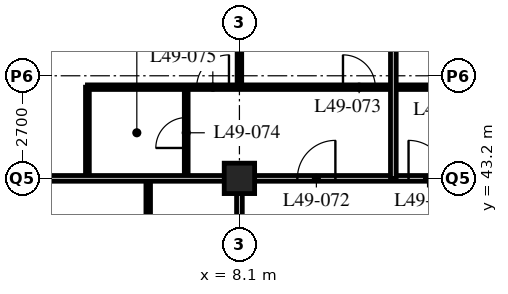
"""IFC4 building model, lengths in metres.
Left out: names, types, materials, properties, quantities, classifications, styles, units other than length and angle.
Written with IfcOpenShell. Run it as: python <this file> out.ifc"""

import sys

from ifc_helpers import new_model, si_unit, direction, frame, frame_2d, origin, origin_2d, place, context, subcontext, project, spatial, rectangle, hollow_rectangle, extrude, element, fill, save


model = new_model("IFC4")
c1 = context("Model", 3, precision=1e-05, world=origin(), true_north=direction((0.0, 1.0)))
c2 = subcontext(c1, "Body", "Model", "MODEL_VIEW")
j1 = project(units=[si_unit("LENGTHUNIT", "METRE"), si_unit("PLANEANGLEUNIT", "RADIAN")], contexts=[c1])
p1 = place(None, origin())
s1 = spatial("IfcSite", under=j1, at=p1, CompositionType="ELEMENT")
p2 = place(p1, origin())
s2 = spatial("IfcBuilding", under=s1, at=p2, CompositionType="ELEMENT")
p3 = place(p2, frame((0.0, 0.0, 192.0)))
s3 = spatial("IfcBuildingStorey", under=s2, at=p3, CompositionType="ELEMENT", Elevation=192.0)
p4 = place(p3, frame((8.1, 43.2, 0.0), z_axis=(0.0, 0.0, 1.0), x_axis=(1.0, 0.0, 0.0)))
e1 = element("IfcColumn", 1, at=p4, inside=s3, PredefinedType="COLUMN", context=c2, shape_type="SweptSolid", body=[
    extrude(hollow_rectangle(XDim=0.8, YDim=0.8, WallThickness=0.08, at=origin_2d()), origin(), (0.0, 0.0, 1.0), 3.6),
])
p5 = place(p3, frame((8.1, 43.2, 0.0), z_axis=(0.0, 0.0, 1.0), x_axis=(1.0, 0.0, 0.0)))
e2 = element("IfcWall", 2, at=p5, inside=s3, PredefinedType="PARTITIONING", context=c2, shape_type="SweptSolid", body=[
    extrude(rectangle(XDim=40.5, YDim=0.15, at=frame_2d((20.25, 0.0))), origin(), (0.0, 0.0, 1.0), 2.778),
])
p6 = place(p5, frame((4.45, 0.0, 0.0)))
e3 = element("IfcOpeningElement", 3, at=p6, cuts=e2, PredefinedType="OPENING", context=c2, shape_type="SweptSolid", body=[
    extrude(rectangle(XDim=1.0, YDim=2.1, at=frame_2d((0.5, 1.05))), frame((0.0, 0.085, 0.0), z_axis=(0.0, -1.0, 0.0), x_axis=(1.0, 0.0, 0.0)), (0.0, 0.0, 1.0), 0.17),
])
p7 = place(p5, frame((20.65, 0.0, 0.0)))
e4 = element("IfcOpeningElement", 4, at=p7, cuts=e2, PredefinedType="OPENING", context=c2, shape_type="SweptSolid", body=[
    extrude(rectangle(XDim=1.0, YDim=2.1, at=frame_2d((0.5, 1.05))), frame((0.0, 0.085, 0.0), z_axis=(0.0, -1.0, 0.0), x_axis=(1.0, 0.0, 0.0)), (0.0, 0.0, 1.0), 0.17),
])
p8 = place(p5, frame((28.75, 0.0, 0.0)))
e5 = element("IfcOpeningElement", 5, at=p8, cuts=e2, PredefinedType="OPENING", context=c2, shape_type="SweptSolid", body=[
    extrude(rectangle(XDim=1.0, YDim=2.1, at=frame_2d((0.5, 1.05))), frame((0.0, 0.085, 0.0), z_axis=(0.0, -1.0, 0.0), x_axis=(1.0, 0.0, 0.0)), (0.0, 0.0, 1.0), 0.17),
])
p9 = place(p5, frame((37.975, 0.0, 0.0)))
e6 = element("IfcOpeningElement", 6, at=p9, cuts=e2, PredefinedType="OPENING", context=c2, shape_type="SweptSolid", body=[
    extrude(rectangle(XDim=1.0, YDim=2.1, at=frame_2d((0.5, 1.05))), frame((0.0, 0.085, 0.0), z_axis=(0.0, -1.0, 0.0), x_axis=(1.0, 0.0, 0.0)), (0.0, 0.0, 1.0), 0.17),
])
p10 = place(p5, frame((1.525, 0.0, 0.0)))
e7 = element("IfcOpeningElement", 7, at=p10, cuts=e2, PredefinedType="OPENING", context=c2, shape_type="SweptSolid", body=[
    extrude(rectangle(XDim=1.0, YDim=2.1, at=frame_2d((0.5, 1.05))), frame((0.0, 0.085, 0.0), z_axis=(0.0, -1.0, 0.0), x_axis=(1.0, 0.0, 0.0)), (0.0, 0.0, 1.0), 0.17),
])
p11 = place(p3, frame((8.1, 18.9, 0.0), z_axis=(0.0, 0.0, 1.0), x_axis=(0.0, 1.0, 0.0)))
e8 = element("IfcWall", 8, at=p11, inside=s3, PredefinedType="PARTITIONING", context=c2, shape_type="SweptSolid", body=[
    extrude(rectangle(XDim=24.3, YDim=0.15, at=frame_2d((12.15, 0.0))), origin(), (0.0, 0.0, 1.0), 2.778),
])
p12 = place(p11, frame((0.9, 0.0, 0.0)))
e9 = element("IfcOpeningElement", 9, at=p12, cuts=e8, PredefinedType="OPENING", context=c2, shape_type="SweptSolid", body=[
    extrude(rectangle(XDim=1.0, YDim=2.1, at=frame_2d((0.5, 1.05))), frame((0.0, 0.085, 0.0), z_axis=(0.0, -1.0, 0.0), x_axis=(1.0, 0.0, 0.0)), (0.0, 0.0, 1.0), 0.17),
])
p13 = place(p11, frame((9.0, 0.0, 0.0)))
e10 = element("IfcOpeningElement", 10, at=p13, cuts=e8, PredefinedType="OPENING", context=c2, shape_type="SweptSolid", body=[
    extrude(rectangle(XDim=1.0, YDim=2.1, at=frame_2d((0.5, 1.05))), frame((0.0, 0.085, 0.0), z_axis=(0.0, -1.0, 0.0), x_axis=(1.0, 0.0, 0.0)), (0.0, 0.0, 1.0), 0.17),
])
p14 = place(p11, frame((17.1, 0.0, 0.0)))
e11 = element("IfcOpeningElement", 11, at=p14, cuts=e8, PredefinedType="OPENING", context=c2, shape_type="SweptSolid", body=[
    extrude(rectangle(XDim=1.0, YDim=2.1, at=frame_2d((0.5, 1.05))), frame((0.0, 0.085, 0.0), z_axis=(0.0, -1.0, 0.0), x_axis=(1.0, 0.0, 0.0)), (0.0, 0.0, 1.0), 0.17),
])
p15 = place(p3, frame((5.7, 18.9, 0.0), z_axis=(0.0, 0.0, 1.0), x_axis=(0.0, 1.0, 0.0)))
e12 = element("IfcWall", 12, at=p15, inside=s3, PredefinedType="PARTITIONING", context=c2, shape_type="SweptSolid", body=[
    extrude(rectangle(XDim=24.3, YDim=0.12, at=frame_2d((12.15, 0.0))), origin(), (0.0, 0.0, 1.0), 3.39),
])
p16 = place(p15, frame((0.975, 0.0, 0.0)))
e13 = element("IfcOpeningElement", 13, at=p16, cuts=e12, PredefinedType="OPENING", context=c2, shape_type="SweptSolid", body=[
    extrude(rectangle(XDim=0.85, YDim=2.1, at=frame_2d((0.425, 1.05))), frame((0.0, 0.07, 0.0), z_axis=(0.0, -1.0, 0.0), x_axis=(1.0, 0.0, 0.0)), (0.0, 0.0, 1.0), 0.14),
])
p17 = place(p15, frame((4.375, 0.0, 0.0)))
e14 = element("IfcOpeningElement", 14, at=p17, cuts=e12, PredefinedType="OPENING", context=c2, shape_type="SweptSolid", body=[
    extrude(rectangle(XDim=0.85, YDim=2.1, at=frame_2d((0.425, 1.05))), frame((0.0, 0.07, 0.0), z_axis=(0.0, -1.0, 0.0), x_axis=(1.0, 0.0, 0.0)), (0.0, 0.0, 1.0), 0.14),
])
p18 = place(p15, frame((9.075, 0.0, 0.0)))
e15 = element("IfcOpeningElement", 15, at=p18, cuts=e12, PredefinedType="OPENING", context=c2, shape_type="SweptSolid", body=[
    extrude(rectangle(XDim=0.85, YDim=2.1, at=frame_2d((0.425, 1.05))), frame((0.0, 0.07, 0.0), z_axis=(0.0, -1.0, 0.0), x_axis=(1.0, 0.0, 0.0)), (0.0, 0.0, 1.0), 0.14),
])
p19 = place(p15, frame((12.475, 0.0, 0.0)))
e16 = element("IfcOpeningElement", 16, at=p19, cuts=e12, PredefinedType="OPENING", context=c2, shape_type="SweptSolid", body=[
    extrude(rectangle(XDim=0.85, YDim=2.1, at=frame_2d((0.425, 1.05))), frame((0.0, 0.07, 0.0), z_axis=(0.0, -1.0, 0.0), x_axis=(1.0, 0.0, 0.0)), (0.0, 0.0, 1.0), 0.14),
])
p20 = place(p15, frame((17.175, 0.0, 0.0)))
e17 = element("IfcOpeningElement", 17, at=p20, cuts=e12, PredefinedType="OPENING", context=c2, shape_type="SweptSolid", body=[
    extrude(rectangle(XDim=0.85, YDim=2.1, at=frame_2d((0.425, 1.05))), frame((0.0, 0.07, 0.0), z_axis=(0.0, -1.0, 0.0), x_axis=(1.0, 0.0, 0.0)), (0.0, 0.0, 1.0), 0.14),
])
p21 = place(p15, frame((20.575, 0.0, 0.0)))
e18 = element("IfcOpeningElement", 18, at=p21, cuts=e12, PredefinedType="OPENING", context=c2, shape_type="SweptSolid", body=[
    extrude(rectangle(XDim=0.85, YDim=2.1, at=frame_2d((0.425, 1.05))), frame((0.0, 0.07, 0.0), z_axis=(0.0, -1.0, 0.0), x_axis=(1.0, 0.0, 0.0)), (0.0, 0.0, 1.0), 0.14),
])
p22 = place(p3, frame((6.7, 43.2, 0.0), z_axis=(0.0, 0.0, 1.0), x_axis=(0.0, 1.0, 0.0)))
e19 = element("IfcWall", 19, at=p22, inside=s3, PredefinedType="PARTITIONING", context=c2, shape_type="SweptSolid", body=[
    extrude(rectangle(XDim=2.4, YDim=0.1, at=frame_2d((1.2, 0.0))), origin(), (0.0, 0.0, 1.0), 3.39),
])
p23 = place(p22, frame((0.8, 0.0, 0.0)))
e20 = element("IfcOpeningElement", 20, at=p23, cuts=e19, PredefinedType="OPENING", context=c2, shape_type="SweptSolid", body=[
    extrude(rectangle(XDim=0.8, YDim=2.1, at=frame_2d((0.4, 1.05))), frame((0.0, 0.06, 0.0), z_axis=(0.0, -1.0, 0.0), x_axis=(1.0, 0.0, 0.0)), (0.0, 0.0, 1.0), 0.12),
])
p24 = place(p3, frame((4.1, 43.2, 0.0), z_axis=(0.0, 0.0, 1.0), x_axis=(0.0, 1.0, 0.0)))
e21 = element("IfcWall", 21, at=p24, inside=s3, PredefinedType="PARTITIONING", context=c2, shape_type="SweptSolid", body=[
    extrude(rectangle(XDim=2.4, YDim=0.1, at=frame_2d((1.2, 0.0))), origin(), (0.0, 0.0, 1.0), 3.39),
])
p25 = place(p3, frame((4.1, 45.6, 0.0), z_axis=(0.0, 0.0, 1.0), x_axis=(1.0, 0.0, 0.0)))
e22 = element("IfcWall", 22, at=p25, inside=s3, PredefinedType="PARTITIONING", context=c2, shape_type="SweptSolid", body=[
    extrude(rectangle(XDim=48.5, YDim=0.12, at=frame_2d((24.25, 0.0))), origin(), (0.0, 0.0, 1.0), 3.39),
])
p26 = place(p25, frame((9.025, 0.0, 0.0)))
e23 = element("IfcOpeningElement", 23, at=p26, cuts=e22, PredefinedType="OPENING", context=c2, shape_type="SweptSolid", body=[
    extrude(rectangle(XDim=0.85, YDim=2.1, at=frame_2d((0.425, 1.05))), frame((0.0, 0.07, 0.0), z_axis=(0.0, -1.0, 0.0), x_axis=(1.0, 0.0, 0.0)), (0.0, 0.0, 1.0), 0.14),
])
p27 = place(p25, frame((16.475, 0.0, 0.0)))
e24 = element("IfcOpeningElement", 24, at=p27, cuts=e22, PredefinedType="OPENING", context=c2, shape_type="SweptSolid", body=[
    extrude(rectangle(XDim=0.85, YDim=2.1, at=frame_2d((0.425, 1.05))), frame((0.0, 0.07, 0.0), z_axis=(0.0, -1.0, 0.0), x_axis=(1.0, 0.0, 0.0)), (0.0, 0.0, 1.0), 0.14),
])
p28 = place(p25, frame((20.525, 0.0, 0.0)))
e25 = element("IfcOpeningElement", 25, at=p28, cuts=e22, PredefinedType="OPENING", context=c2, shape_type="SweptSolid", body=[
    extrude(rectangle(XDim=0.85, YDim=2.1, at=frame_2d((0.425, 1.05))), frame((0.0, 0.07, 0.0), z_axis=(0.0, -1.0, 0.0), x_axis=(1.0, 0.0, 0.0)), (0.0, 0.0, 1.0), 0.14),
])
p29 = place(p25, frame((25.225, 0.0, 0.0)))
e26 = element("IfcOpeningElement", 26, at=p29, cuts=e22, PredefinedType="OPENING", context=c2, shape_type="SweptSolid", body=[
    extrude(rectangle(XDim=0.85, YDim=2.1, at=frame_2d((0.425, 1.05))), frame((0.0, 0.07, 0.0), z_axis=(0.0, -1.0, 0.0), x_axis=(1.0, 0.0, 0.0)), (0.0, 0.0, 1.0), 0.14),
])
p30 = place(p25, frame((28.625, 0.0, 0.0)))
e27 = element("IfcOpeningElement", 27, at=p30, cuts=e22, PredefinedType="OPENING", context=c2, shape_type="SweptSolid", body=[
    extrude(rectangle(XDim=0.85, YDim=2.1, at=frame_2d((0.425, 1.05))), frame((0.0, 0.07, 0.0), z_axis=(0.0, -1.0, 0.0), x_axis=(1.0, 0.0, 0.0)), (0.0, 0.0, 1.0), 0.14),
])
p31 = place(p25, frame((33.325, 0.0, 0.0)))
e28 = element("IfcOpeningElement", 28, at=p31, cuts=e22, PredefinedType="OPENING", context=c2, shape_type="SweptSolid", body=[
    extrude(rectangle(XDim=0.85, YDim=2.1, at=frame_2d((0.425, 1.05))), frame((0.0, 0.07, 0.0), z_axis=(0.0, -1.0, 0.0), x_axis=(1.0, 0.0, 0.0)), (0.0, 0.0, 1.0), 0.14),
])
p32 = place(p25, frame((36.725, 0.0, 0.0)))
e29 = element("IfcOpeningElement", 29, at=p32, cuts=e22, PredefinedType="OPENING", context=c2, shape_type="SweptSolid", body=[
    extrude(rectangle(XDim=0.85, YDim=2.1, at=frame_2d((0.425, 1.05))), frame((0.0, 0.07, 0.0), z_axis=(0.0, -1.0, 0.0), x_axis=(1.0, 0.0, 0.0)), (0.0, 0.0, 1.0), 0.14),
])
p33 = place(p25, frame((40.925, 0.0, 0.0)))
e30 = element("IfcOpeningElement", 30, at=p33, cuts=e22, PredefinedType="OPENING", context=c2, shape_type="SweptSolid", body=[
    extrude(rectangle(XDim=0.85, YDim=2.1, at=frame_2d((0.425, 1.05))), frame((0.0, 0.07, 0.0), z_axis=(0.0, -1.0, 0.0), x_axis=(1.0, 0.0, 0.0)), (0.0, 0.0, 1.0), 0.14),
])
p34 = place(p25, frame((44.775, 0.0, 0.0)))
e31 = element("IfcOpeningElement", 31, at=p34, cuts=e22, PredefinedType="OPENING", context=c2, shape_type="SweptSolid", body=[
    extrude(rectangle(XDim=0.85, YDim=2.1, at=frame_2d((0.425, 1.05))), frame((0.0, 0.07, 0.0), z_axis=(0.0, -1.0, 0.0), x_axis=(1.0, 0.0, 0.0)), (0.0, 0.0, 1.0), 0.14),
])
p35 = place(p25, frame((6.725, 0.0, 0.0)))
e32 = element("IfcOpeningElement", 32, at=p35, cuts=e22, PredefinedType="OPENING", context=c2, shape_type="SweptSolid", body=[
    extrude(rectangle(XDim=0.85, YDim=2.1, at=frame_2d((0.425, 1.05))), frame((0.0, 0.07, 0.0), z_axis=(0.0, -1.0, 0.0), x_axis=(1.0, 0.0, 0.0)), (0.0, 0.0, 1.0), 0.14),
])
p36 = place(p25, frame((2.875, 0.0, 0.0)))
e33 = element("IfcOpeningElement", 33, at=p36, cuts=e22, PredefinedType="OPENING", context=c2, shape_type="SweptSolid", body=[
    extrude(rectangle(XDim=0.85, YDim=2.1, at=frame_2d((0.425, 1.05))), frame((0.0, 0.07, 0.0), z_axis=(0.0, -1.0, 0.0), x_axis=(1.0, 0.0, 0.0)), (0.0, 0.0, 1.0), 0.14),
])
p37 = place(p3, frame((8.1, 45.6, 0.0), z_axis=(0.0, 0.0, 1.0), x_axis=(0.0, 1.0, 0.0)))
e34 = element("IfcWall", 34, at=p37, inside=s3, PredefinedType="PARTITIONING", context=c2, shape_type="SweptSolid", body=[
    extrude(rectangle(XDim=9.45, YDim=0.12, at=frame_2d((4.725, 0.0))), origin(), (0.0, 0.0, 1.0), 2.778),
])
p38 = place(p3, frame((0.3, 43.2, 0.0), z_axis=(0.0, 0.0, 1.0), x_axis=(1.0, 0.0, 0.0)))
e35 = element("IfcWall", 35, at=p38, inside=s3, PredefinedType="PARTITIONING", context=c2, shape_type="SweptSolid", body=[
    extrude(rectangle(XDim=7.8, YDim=0.15, at=frame_2d((3.9, 0.0))), origin(), (0.0, 0.0, 1.0), 2.778),
])
p39 = place(p3, frame((12.15, 43.2, 0.0), z_axis=(0.0, 0.0, 1.0), x_axis=(0.0, 1.0, 0.0)))
e36 = element("IfcWall", 36, at=p39, inside=s3, PredefinedType="PARTITIONING", context=c2, shape_type="SweptSolid", body=[
    extrude(rectangle(XDim=15.9, YDim=0.15, at=frame_2d((7.95, 0.0))), origin(), (0.0, 0.0, 1.0), 3.39),
])
p40 = place(p6, origin())
e37 = element("IfcDoor", 37, at=p40, inside=s3, OperationType="SINGLE_SWING_LEFT", PredefinedType="DOOR", context=c2, shape_type="SweptSolid", body=[
    extrude(rectangle(XDim=1.0, YDim=2.1, at=frame_2d((0.5, 1.05))), frame((0.0, 0.025, 0.0), z_axis=(0.0, -1.0, 0.0), x_axis=(1.0, 0.0, 0.0)), (0.0, 0.0, 1.0), 0.05),
])
fill(e3, e37)
p41 = place(p10, origin())
e38 = element("IfcDoor", 38, at=p41, inside=s3, OperationType="SINGLE_SWING_RIGHT", PredefinedType="DOOR", context=c2, shape_type="SweptSolid", body=[
    extrude(rectangle(XDim=1.0, YDim=2.1, at=frame_2d((0.5, 1.05))), frame((0.0, 0.025, 0.0), z_axis=(0.0, -1.0, 0.0), x_axis=(1.0, 0.0, 0.0)), (0.0, 0.0, 1.0), 0.05),
])
fill(e7, e38)
p42 = place(p35, origin())
e39 = element("IfcDoor", 39, at=p42, inside=s3, OperationType="SINGLE_SWING_LEFT", PredefinedType="DOOR", context=c2, shape_type="SweptSolid", body=[
    extrude(rectangle(XDim=0.85, YDim=2.1, at=frame_2d((0.425, 1.05))), frame((0.0, 0.025, 0.0), z_axis=(0.0, -1.0, 0.0), x_axis=(1.0, 0.0, 0.0)), (0.0, 0.0, 1.0), 0.05),
])
fill(e32, e39)
p43 = place(p23, origin())
e40 = element("IfcDoor", 40, at=p43, inside=s3, OperationType="SINGLE_SWING_LEFT", PredefinedType="DOOR", context=c2, shape_type="SweptSolid", body=[
    extrude(rectangle(XDim=0.8, YDim=2.1, at=frame_2d((0.4, 1.05))), frame((0.0, 0.025, 0.0), z_axis=(0.0, -1.0, 0.0), x_axis=(1.0, 0.0, 0.0)), (0.0, 0.0, 1.0), 0.05),
])
fill(e20, e40)
p44 = place(p36, origin())
e41 = element("IfcDoor", 41, at=p44, inside=s3, OperationType="SINGLE_SWING_RIGHT", PredefinedType="DOOR", context=c2, shape_type="SweptSolid", body=[
    extrude(rectangle(XDim=0.85, YDim=2.1, at=frame_2d((0.425, 1.05))), frame((0.0, 0.025, 0.0), z_axis=(0.0, -1.0, 0.0), x_axis=(1.0, 0.0, 0.0)), (0.0, 0.0, 1.0), 0.05),
])
fill(e33, e41)
save(model, sys.argv[1])
